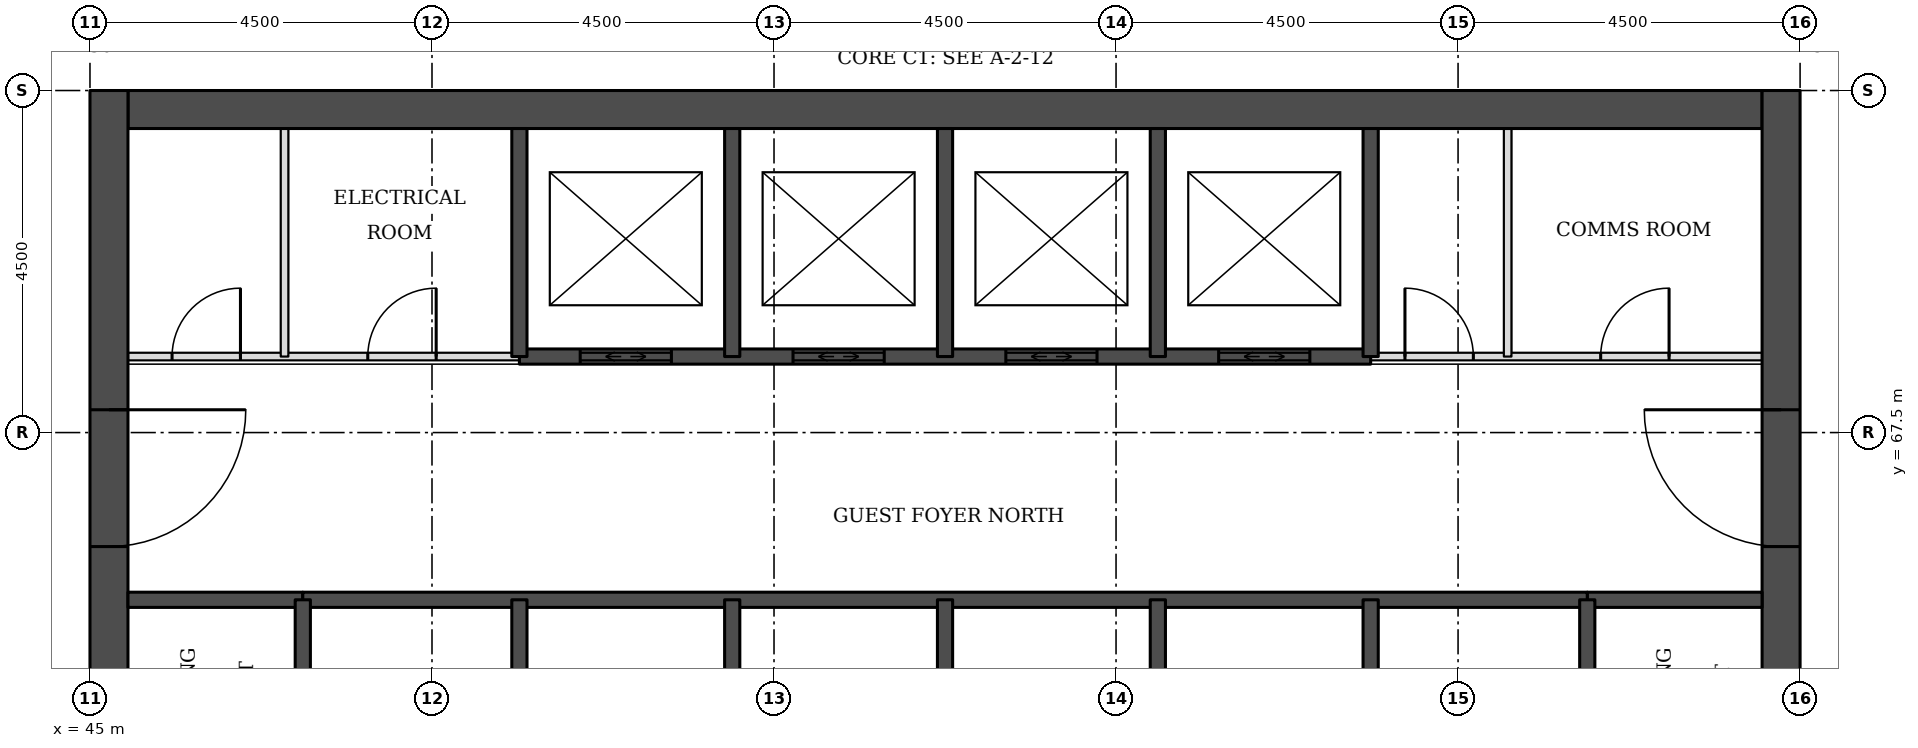
"""IFC4 building model, lengths in metres.
Left out: names, types, materials, properties, quantities, classifications, styles, units other than length and angle.
Written with IfcOpenShell. Run it as: python <this file> out.ifc"""

import sys

from ifc_helpers import new_model, si_unit, direction, frame, frame_2d, origin, place, context, subcontext, project, spatial, rectangle, extrude, element, fill, save


model = new_model("IFC4")
c1 = context("Model", 3, precision=1e-05, world=origin(), true_north=direction((0.0, 1.0)))
c2 = subcontext(c1, "Body", "Model", "MODEL_VIEW")
j1 = project(units=[si_unit("LENGTHUNIT", "METRE"), si_unit("PLANEANGLEUNIT", "RADIAN")], contexts=[c1])
p1 = place(None, origin())
s1 = spatial("IfcSite", under=j1, at=p1, CompositionType="ELEMENT")
p2 = place(p1, origin())
s2 = spatial("IfcBuilding", under=s1, at=p2, CompositionType="ELEMENT")
p3 = place(p2, frame((0.0, 0.0, 39.6)))
s3 = spatial("IfcBuildingStorey", under=s2, at=p3, CompositionType="ELEMENT", Elevation=39.6)
p4 = place(p3, frame((45.5, 71.75, 0.0), z_axis=(0.0, 0.0, 1.0), x_axis=(1.0, 0.0, 0.0)))
e1 = element("IfcWall", 1, at=p4, inside=s3, PredefinedType="SHEAR", context=c2, shape_type="SweptSolid", body=[
    extrude(rectangle(XDim=21.5, YDim=0.5, at=frame_2d((10.75, 0.0))), origin(), (0.0, 0.0, 1.0), 3.3),
])
p5 = place(p3, frame((45.25, 49.5, 0.0), z_axis=(0.0, 0.0, 1.0), x_axis=(0.0, 1.0, 0.0)))
e2 = element("IfcWall", 2, at=p5, inside=s3, PredefinedType="SHEAR", context=c2, shape_type="SweptSolid", body=[
    extrude(rectangle(XDim=22.5, YDim=0.5, at=frame_2d((11.25, 0.0))), origin(), (0.0, 0.0, 1.0), 3.3),
])
p6 = place(p5, frame((4.2, 0.0, 0.0)))
e3 = element("IfcOpeningElement", 3, at=p6, cuts=e2, PredefinedType="OPENING", context=c2, shape_type="SweptSolid", body=[
    extrude(rectangle(XDim=1.8, YDim=2.1, at=frame_2d((0.9, 1.05))), frame((0.0, 0.26, 0.0), z_axis=(0.0, -1.0, 0.0), x_axis=(1.0, 0.0, 0.0)), (0.0, 0.0, 1.0), 0.52),
])
p7 = place(p5, frame((6.9, 0.0, 0.0)))
e4 = element("IfcOpeningElement", 4, at=p7, cuts=e2, PredefinedType="OPENING", context=c2, shape_type="SweptSolid", body=[
    extrude(rectangle(XDim=1.1, YDim=2.1, at=frame_2d((0.55, 1.05))), frame((0.0, 0.26, 0.0), z_axis=(0.0, -1.0, 0.0), x_axis=(1.0, 0.0, 0.0)), (0.0, 0.0, 1.0), 0.52),
])
p8 = place(p5, frame((13.6, 0.0, 0.0)))
e5 = element("IfcOpeningElement", 5, at=p8, cuts=e2, PredefinedType="OPENING", context=c2, shape_type="SweptSolid", body=[
    extrude(rectangle(XDim=1.1, YDim=2.1, at=frame_2d((0.55, 1.05))), frame((0.0, 0.26, 0.0), z_axis=(0.0, -1.0, 0.0), x_axis=(1.0, 0.0, 0.0)), (0.0, 0.0, 1.0), 0.52),
])
p9 = place(p5, frame((16.5, 0.0, 0.0)))
e6 = element("IfcOpeningElement", 6, at=p9, cuts=e2, PredefinedType="OPENING", context=c2, shape_type="SweptSolid", body=[
    extrude(rectangle(XDim=1.8, YDim=2.1, at=frame_2d((0.9, 1.05))), frame((0.0, 0.26, 0.0), z_axis=(0.0, -1.0, 0.0), x_axis=(1.0, 0.0, 0.0)), (0.0, 0.0, 1.0), 0.52),
])
p10 = place(p3, frame((67.25, 49.5, 0.0), z_axis=(0.0, 0.0, 1.0), x_axis=(0.0, 1.0, 0.0)))
e7 = element("IfcWall", 7, at=p10, inside=s3, PredefinedType="SHEAR", context=c2, shape_type="SweptSolid", body=[
    extrude(rectangle(XDim=22.5, YDim=0.5, at=frame_2d((11.25, 0.0))), origin(), (0.0, 0.0, 1.0), 3.3),
])
p11 = place(p10, frame((4.2, 0.0, 0.0)))
e8 = element("IfcOpeningElement", 8, at=p11, cuts=e7, PredefinedType="OPENING", context=c2, shape_type="SweptSolid", body=[
    extrude(rectangle(XDim=1.8, YDim=2.1, at=frame_2d((0.9, 1.05))), frame((0.0, 0.26, 0.0), z_axis=(0.0, -1.0, 0.0), x_axis=(1.0, 0.0, 0.0)), (0.0, 0.0, 1.0), 0.52),
])
p12 = place(p10, frame((6.9, 0.0, 0.0)))
e9 = element("IfcOpeningElement", 9, at=p12, cuts=e7, PredefinedType="OPENING", context=c2, shape_type="SweptSolid", body=[
    extrude(rectangle(XDim=1.1, YDim=2.1, at=frame_2d((0.55, 1.05))), frame((0.0, 0.26, 0.0), z_axis=(0.0, -1.0, 0.0), x_axis=(1.0, 0.0, 0.0)), (0.0, 0.0, 1.0), 0.52),
])
p13 = place(p10, frame((13.6, 0.0, 0.0)))
e10 = element("IfcOpeningElement", 10, at=p13, cuts=e7, PredefinedType="OPENING", context=c2, shape_type="SweptSolid", body=[
    extrude(rectangle(XDim=1.1, YDim=2.1, at=frame_2d((0.55, 1.05))), frame((0.0, 0.26, 0.0), z_axis=(0.0, -1.0, 0.0), x_axis=(1.0, 0.0, 0.0)), (0.0, 0.0, 1.0), 0.52),
])
p14 = place(p10, frame((16.5, 0.0, 0.0)))
e11 = element("IfcOpeningElement", 11, at=p14, cuts=e7, PredefinedType="OPENING", context=c2, shape_type="SweptSolid", body=[
    extrude(rectangle(XDim=1.8, YDim=2.1, at=frame_2d((0.9, 1.05))), frame((0.0, 0.26, 0.0), z_axis=(0.0, -1.0, 0.0), x_axis=(1.0, 0.0, 0.0)), (0.0, 0.0, 1.0), 0.52),
])
for number, where, z_axis, x_axis in (
    (12, (45.5, 65.3, 0.0), (0.0, 0.0, 1.0), (1.0, 0.0, 0.0)),
    (13, (64.7, 65.3, 0.0), (0.0, 0.0, 1.0), (1.0, 0.0, 0.0)),
):
    element("IfcWall", number, at=place(p3, frame(where, z_axis=z_axis, x_axis=x_axis)), inside=s3, PredefinedType="SOLIDWALL", context=c2, shape_type="SweptSolid", body=[
        extrude(rectangle(XDim=2.3, YDim=0.2, at=frame_2d((1.15, 0.0))), origin(), (0.0, 0.0, 1.0), 3.08),
    ])
p15 = place(p3, frame((47.8, 65.3, 0.0), z_axis=(0.0, 0.0, 1.0), x_axis=(1.0, 0.0, 0.0)))
e14 = element("IfcWall", 14, at=p15, inside=s3, PredefinedType="SOLIDWALL", context=c2, shape_type="SweptSolid", body=[
    extrude(rectangle(XDim=16.9, YDim=0.2, at=frame_2d((8.45, 0.0))), origin(), (0.0, 0.0, 1.0), 3.08),
])
p16 = place(p3, frame((45.5, 68.5, 0.0), z_axis=(0.0, 0.0, 1.0), x_axis=(1.0, 0.0, 0.0)))
e15 = element("IfcWall", 15, at=p16, inside=s3, PredefinedType="PARTITIONING", context=c2, shape_type="SweptSolid", body=[
    extrude(rectangle(XDim=5.15, YDim=0.1, at=frame_2d((2.575, 0.0))), origin(), (0.0, 0.0, 1.0), 3.08),
])
p17 = place(p16, frame((0.58, 0.0, 0.0)))
e16 = element("IfcOpeningElement", 16, at=p17, cuts=e15, PredefinedType="OPENING", context=c2, shape_type="SweptSolid", body=[
    extrude(rectangle(XDim=0.9, YDim=2.1, at=frame_2d((0.45, 1.05))), frame((0.0, 0.06, 0.0), z_axis=(0.0, -1.0, 0.0), x_axis=(1.0, 0.0, 0.0)), (0.0, 0.0, 1.0), 0.12),
])
p18 = place(p16, frame((3.155, 0.0, 0.0)))
e17 = element("IfcOpeningElement", 17, at=p18, cuts=e15, PredefinedType="OPENING", context=c2, shape_type="SweptSolid", body=[
    extrude(rectangle(XDim=0.9, YDim=2.1, at=frame_2d((0.45, 1.05))), frame((0.0, 0.06, 0.0), z_axis=(0.0, -1.0, 0.0), x_axis=(1.0, 0.0, 0.0)), (0.0, 0.0, 1.0), 0.12),
])
p19 = place(p3, frame((61.85, 68.5, 0.0), z_axis=(0.0, 0.0, 1.0), x_axis=(1.0, 0.0, 0.0)))
e18 = element("IfcWall", 18, at=p19, inside=s3, PredefinedType="PARTITIONING", context=c2, shape_type="SweptSolid", body=[
    extrude(rectangle(XDim=5.15, YDim=0.1, at=frame_2d((2.575, 0.0))), origin(), (0.0, 0.0, 1.0), 3.08),
])
p20 = place(p19, frame((3.026, 0.0, 0.0)))
e19 = element("IfcOpeningElement", 19, at=p20, cuts=e18, PredefinedType="OPENING", context=c2, shape_type="SweptSolid", body=[
    extrude(rectangle(XDim=0.9, YDim=2.1, at=frame_2d((0.45, 1.05))), frame((0.0, 0.06, 0.0), z_axis=(0.0, -1.0, 0.0), x_axis=(1.0, 0.0, 0.0)), (0.0, 0.0, 1.0), 0.12),
])
p21 = place(p19, frame((0.451, 0.0, 0.0)))
e20 = element("IfcOpeningElement", 20, at=p21, cuts=e18, PredefinedType="OPENING", context=c2, shape_type="SweptSolid", body=[
    extrude(rectangle(XDim=0.9, YDim=2.1, at=frame_2d((0.45, 1.05))), frame((0.0, 0.06, 0.0), z_axis=(0.0, -1.0, 0.0), x_axis=(1.0, 0.0, 0.0)), (0.0, 0.0, 1.0), 0.12),
])
p22 = place(p3, frame((50.65, 68.5, 0.0), z_axis=(0.0, 0.0, 1.0), x_axis=(1.0, 0.0, 0.0)))
e21 = element("IfcWall", 21, at=p22, inside=s3, PredefinedType="SOLIDWALL", context=c2, shape_type="SweptSolid", body=[
    extrude(rectangle(XDim=11.2, YDim=0.2, at=frame_2d((5.6, 0.0))), origin(), (0.0, 0.0, 1.0), 3.08),
])
p23 = place(p22, frame((0.8, 0.0, 0.0)))
e22 = element("IfcOpeningElement", 22, at=p23, cuts=e21, PredefinedType="OPENING", context=c2, shape_type="SweptSolid", body=[
    extrude(rectangle(XDim=1.2, YDim=2.1, at=frame_2d((0.6, 1.05))), frame((0.0, 0.11, 0.0), z_axis=(0.0, -1.0, 0.0), x_axis=(1.0, 0.0, 0.0)), (0.0, 0.0, 1.0), 0.22),
])
p24 = place(p22, frame((3.6, 0.0, 0.0)))
e23 = element("IfcOpeningElement", 23, at=p24, cuts=e21, PredefinedType="OPENING", context=c2, shape_type="SweptSolid", body=[
    extrude(rectangle(XDim=1.2, YDim=2.1, at=frame_2d((0.6, 1.05))), frame((0.0, 0.11, 0.0), z_axis=(0.0, -1.0, 0.0), x_axis=(1.0, 0.0, 0.0)), (0.0, 0.0, 1.0), 0.22),
])
p25 = place(p22, frame((6.4, 0.0, 0.0)))
e24 = element("IfcOpeningElement", 24, at=p25, cuts=e21, PredefinedType="OPENING", context=c2, shape_type="SweptSolid", body=[
    extrude(rectangle(XDim=1.2, YDim=2.1, at=frame_2d((0.6, 1.05))), frame((0.0, 0.11, 0.0), z_axis=(0.0, -1.0, 0.0), x_axis=(1.0, 0.0, 0.0)), (0.0, 0.0, 1.0), 0.22),
])
p26 = place(p22, frame((9.2, 0.0, 0.0)))
e25 = element("IfcOpeningElement", 25, at=p26, cuts=e21, PredefinedType="OPENING", context=c2, shape_type="SweptSolid", body=[
    extrude(rectangle(XDim=1.2, YDim=2.1, at=frame_2d((0.6, 1.05))), frame((0.0, 0.11, 0.0), z_axis=(0.0, -1.0, 0.0), x_axis=(1.0, 0.0, 0.0)), (0.0, 0.0, 1.0), 0.22),
])
p27 = place(p3, frame((47.56, 68.5, 0.0), z_axis=(0.0, 0.0, 1.0), x_axis=(0.0, 1.0, 0.0)))
e26 = element("IfcWall", 26, at=p27, inside=s3, PredefinedType="PARTITIONING", context=c2, shape_type="SweptSolid", body=[
    extrude(rectangle(XDim=3.0, YDim=0.1, at=frame_2d((1.5, 0.0))), origin(), (0.0, 0.0, 1.0), 3.08),
])
p28 = place(p3, frame((47.8, 62.0, 0.0), z_axis=(0.0, 0.0, 1.0), x_axis=(0.0, 1.0, 0.0)))
e27 = element("IfcWall", 27, at=p28, inside=s3, PredefinedType="SOLIDWALL", context=c2, shape_type="SweptSolid", body=[
    extrude(rectangle(XDim=3.3, YDim=0.2, at=frame_2d((1.65, 0.0))), origin(), (0.0, 0.0, 1.0), 3.08),
])
p29 = place(p28, frame((1.1, 0.0, 0.0)))
e28 = element("IfcOpeningElement", 28, at=p29, cuts=e27, PredefinedType="OPENING", context=c2, shape_type="SweptSolid", body=[
    extrude(rectangle(XDim=1.1, YDim=2.1, at=frame_2d((0.55, 1.05))), frame((0.0, 0.11, 0.0), z_axis=(0.0, -1.0, 0.0), x_axis=(1.0, 0.0, 0.0)), (0.0, 0.0, 1.0), 0.22),
])
p30 = place(p3, frame((50.65, 62.0, 0.0), z_axis=(0.0, 0.0, 1.0), x_axis=(0.0, 1.0, 0.0)))
e29 = element("IfcWall", 29, at=p30, inside=s3, PredefinedType="SOLIDWALL", context=c2, shape_type="SweptSolid", body=[
    extrude(rectangle(XDim=3.3, YDim=0.2, at=frame_2d((1.65, 0.0))), origin(), (0.0, 0.0, 1.0), 3.08),
])
p31 = place(p3, frame((50.65, 68.5, 0.0), z_axis=(0.0, 0.0, 1.0), x_axis=(0.0, 1.0, 0.0)))
e30 = element("IfcWall", 30, at=p31, inside=s3, PredefinedType="SOLIDWALL", context=c2, shape_type="SweptSolid", body=[
    extrude(rectangle(XDim=3.0, YDim=0.2, at=frame_2d((1.5, 0.0))), origin(), (0.0, 0.0, 1.0), 3.08),
])
p32 = place(p3, frame((53.45, 62.5, 0.0), z_axis=(0.0, 0.0, 1.0), x_axis=(0.0, 1.0, 0.0)))
e31 = element("IfcWall", 31, at=p32, inside=s3, PredefinedType="SOLIDWALL", context=c2, shape_type="SweptSolid", body=[
    extrude(rectangle(XDim=2.8, YDim=0.2, at=frame_2d((1.4, 0.0))), origin(), (0.0, 0.0, 1.0), 3.08),
])
p33 = place(p3, frame((53.45, 68.5, 0.0), z_axis=(0.0, 0.0, 1.0), x_axis=(0.0, 1.0, 0.0)))
e32 = element("IfcWall", 32, at=p33, inside=s3, PredefinedType="SOLIDWALL", context=c2, shape_type="SweptSolid", body=[
    extrude(rectangle(XDim=3.0, YDim=0.2, at=frame_2d((1.5, 0.0))), origin(), (0.0, 0.0, 1.0), 3.08),
])
p34 = place(p3, frame((56.25, 62.5, 0.0), z_axis=(0.0, 0.0, 1.0), x_axis=(0.0, 1.0, 0.0)))
e33 = element("IfcWall", 33, at=p34, inside=s3, PredefinedType="SOLIDWALL", context=c2, shape_type="SweptSolid", body=[
    extrude(rectangle(XDim=2.8, YDim=0.2, at=frame_2d((1.4, 0.0))), origin(), (0.0, 0.0, 1.0), 3.08),
])
p35 = place(p3, frame((56.25, 68.5, 0.0), z_axis=(0.0, 0.0, 1.0), x_axis=(0.0, 1.0, 0.0)))
e34 = element("IfcWall", 34, at=p35, inside=s3, PredefinedType="SOLIDWALL", context=c2, shape_type="SweptSolid", body=[
    extrude(rectangle(XDim=3.0, YDim=0.2, at=frame_2d((1.5, 0.0))), origin(), (0.0, 0.0, 1.0), 3.08),
])
p36 = place(p3, frame((59.05, 62.5, 0.0), z_axis=(0.0, 0.0, 1.0), x_axis=(0.0, 1.0, 0.0)))
e35 = element("IfcWall", 35, at=p36, inside=s3, PredefinedType="SOLIDWALL", context=c2, shape_type="SweptSolid", body=[
    extrude(rectangle(XDim=2.8, YDim=0.2, at=frame_2d((1.4, 0.0))), origin(), (0.0, 0.0, 1.0), 3.08),
])
p37 = place(p3, frame((59.05, 68.5, 0.0), z_axis=(0.0, 0.0, 1.0), x_axis=(0.0, 1.0, 0.0)))
e36 = element("IfcWall", 36, at=p37, inside=s3, PredefinedType="SOLIDWALL", context=c2, shape_type="SweptSolid", body=[
    extrude(rectangle(XDim=3.0, YDim=0.2, at=frame_2d((1.5, 0.0))), origin(), (0.0, 0.0, 1.0), 3.08),
])
p38 = place(p3, frame((61.85, 62.0, 0.0), z_axis=(0.0, 0.0, 1.0), x_axis=(0.0, 1.0, 0.0)))
e37 = element("IfcWall", 37, at=p38, inside=s3, PredefinedType="SOLIDWALL", context=c2, shape_type="SweptSolid", body=[
    extrude(rectangle(XDim=3.3, YDim=0.2, at=frame_2d((1.65, 0.0))), origin(), (0.0, 0.0, 1.0), 3.08),
])
p39 = place(p3, frame((61.85, 68.5, 0.0), z_axis=(0.0, 0.0, 1.0), x_axis=(0.0, 1.0, 0.0)))
e38 = element("IfcWall", 38, at=p39, inside=s3, PredefinedType="SOLIDWALL", context=c2, shape_type="SweptSolid", body=[
    extrude(rectangle(XDim=3.0, YDim=0.2, at=frame_2d((1.5, 0.0))), origin(), (0.0, 0.0, 1.0), 3.08),
])
p40 = place(p3, frame((63.653, 68.5, 0.0), z_axis=(0.0, 0.0, 1.0), x_axis=(0.0, 1.0, 0.0)))
e39 = element("IfcWall", 39, at=p40, inside=s3, PredefinedType="PARTITIONING", context=c2, shape_type="SweptSolid", body=[
    extrude(rectangle(XDim=3.0, YDim=0.1, at=frame_2d((1.5, 0.0))), origin(), (0.0, 0.0, 1.0), 3.08),
])
p41 = place(p3, frame((64.7, 62.0, 0.0), z_axis=(0.0, 0.0, 1.0), x_axis=(0.0, 1.0, 0.0)))
e40 = element("IfcWall", 40, at=p41, inside=s3, PredefinedType="SOLIDWALL", context=c2, shape_type="SweptSolid", body=[
    extrude(rectangle(XDim=3.3, YDim=0.2, at=frame_2d((1.65, 0.0))), origin(), (0.0, 0.0, 1.0), 3.08),
])
p42 = place(p41, frame((1.1, 0.0, 0.0)))
e41 = element("IfcOpeningElement", 41, at=p42, cuts=e40, PredefinedType="OPENING", context=c2, shape_type="SweptSolid", body=[
    extrude(rectangle(XDim=1.1, YDim=2.1, at=frame_2d((0.55, 1.05))), frame((0.0, 0.11, 0.0), z_axis=(0.0, -1.0, 0.0), x_axis=(1.0, 0.0, 0.0)), (0.0, 0.0, 1.0), 0.22),
])
p43 = place(p23, origin())
e42 = element("IfcDoor", 42, at=p43, inside=s3, OperationType="DOUBLE_DOOR_SLIDING", PredefinedType="DOOR", context=c2, shape_type="SweptSolid", body=[
    extrude(rectangle(XDim=1.2, YDim=2.1, at=frame_2d((0.6, 1.05))), frame((0.0, 0.025, 0.0), z_axis=(0.0, -1.0, 0.0), x_axis=(1.0, 0.0, 0.0)), (0.0, 0.0, 1.0), 0.05),
])
fill(e22, e42)
p44 = place(p24, origin())
e43 = element("IfcDoor", 43, at=p44, inside=s3, OperationType="DOUBLE_DOOR_SLIDING", PredefinedType="DOOR", context=c2, shape_type="SweptSolid", body=[
    extrude(rectangle(XDim=1.2, YDim=2.1, at=frame_2d((0.6, 1.05))), frame((0.0, 0.025, 0.0), z_axis=(0.0, -1.0, 0.0), x_axis=(1.0, 0.0, 0.0)), (0.0, 0.0, 1.0), 0.05),
])
fill(e23, e43)
p45 = place(p25, origin())
e44 = element("IfcDoor", 44, at=p45, inside=s3, OperationType="DOUBLE_DOOR_SLIDING", PredefinedType="DOOR", context=c2, shape_type="SweptSolid", body=[
    extrude(rectangle(XDim=1.2, YDim=2.1, at=frame_2d((0.6, 1.05))), frame((0.0, 0.025, 0.0), z_axis=(0.0, -1.0, 0.0), x_axis=(1.0, 0.0, 0.0)), (0.0, 0.0, 1.0), 0.05),
])
fill(e24, e44)
p46 = place(p26, origin())
e45 = element("IfcDoor", 45, at=p46, inside=s3, OperationType="DOUBLE_DOOR_SLIDING", PredefinedType="DOOR", context=c2, shape_type="SweptSolid", body=[
    extrude(rectangle(XDim=1.2, YDim=2.1, at=frame_2d((0.6, 1.05))), frame((0.0, 0.025, 0.0), z_axis=(0.0, -1.0, 0.0), x_axis=(1.0, 0.0, 0.0)), (0.0, 0.0, 1.0), 0.05),
])
fill(e25, e45)
p47 = place(p9, frame((1.8, 0.0, 0.0), z_axis=(0.0, 0.0, 1.0), x_axis=(-1.0, 0.0, 0.0)))
e46 = element("IfcDoor", 46, at=p47, inside=s3, OperationType="SINGLE_SWING_LEFT", PredefinedType="DOOR", context=c2, shape_type="SweptSolid", body=[
    extrude(rectangle(XDim=1.8, YDim=2.1, at=frame_2d((0.9, 1.05))), frame((0.0, 0.025, 0.0), z_axis=(0.0, -1.0, 0.0), x_axis=(1.0, 0.0, 0.0)), (0.0, 0.0, 1.0), 0.05),
])
fill(e6, e46)
p48 = place(p14, origin())
e47 = element("IfcDoor", 47, at=p48, inside=s3, OperationType="SINGLE_SWING_RIGHT", PredefinedType="DOOR", context=c2, shape_type="SweptSolid", body=[
    extrude(rectangle(XDim=1.8, YDim=2.1, at=frame_2d((0.9, 1.05))), frame((0.0, 0.025, 0.0), z_axis=(0.0, -1.0, 0.0), x_axis=(1.0, 0.0, 0.0)), (0.0, 0.0, 1.0), 0.05),
])
fill(e11, e47)
p49 = place(p20, origin())
e48 = element("IfcDoor", 48, at=p49, inside=s3, OperationType="SINGLE_SWING_RIGHT", PredefinedType="DOOR", context=c2, shape_type="SweptSolid", body=[
    extrude(rectangle(XDim=0.9, YDim=2.1, at=frame_2d((0.45, 1.05))), frame((0.0, 0.025, 0.0), z_axis=(0.0, -1.0, 0.0), x_axis=(1.0, 0.0, 0.0)), (0.0, 0.0, 1.0), 0.05),
])
fill(e19, e48)
p50 = place(p21, origin())
e49 = element("IfcDoor", 49, at=p50, inside=s3, OperationType="SINGLE_SWING_LEFT", PredefinedType="DOOR", context=c2, shape_type="SweptSolid", body=[
    extrude(rectangle(XDim=0.9, YDim=2.1, at=frame_2d((0.45, 1.05))), frame((0.0, 0.025, 0.0), z_axis=(0.0, -1.0, 0.0), x_axis=(1.0, 0.0, 0.0)), (0.0, 0.0, 1.0), 0.05),
])
fill(e20, e49)
p51 = place(p17, origin())
e50 = element("IfcDoor", 50, at=p51, inside=s3, OperationType="SINGLE_SWING_RIGHT", PredefinedType="DOOR", context=c2, shape_type="SweptSolid", body=[
    extrude(rectangle(XDim=0.9, YDim=2.1, at=frame_2d((0.45, 1.05))), frame((0.0, 0.025, 0.0), z_axis=(0.0, -1.0, 0.0), x_axis=(1.0, 0.0, 0.0)), (0.0, 0.0, 1.0), 0.05),
])
fill(e16, e50)
p52 = place(p18, origin())
e51 = element("IfcDoor", 51, at=p52, inside=s3, OperationType="SINGLE_SWING_RIGHT", PredefinedType="DOOR", context=c2, shape_type="SweptSolid", body=[
    extrude(rectangle(XDim=0.9, YDim=2.1, at=frame_2d((0.45, 1.05))), frame((0.0, 0.025, 0.0), z_axis=(0.0, -1.0, 0.0), x_axis=(1.0, 0.0, 0.0)), (0.0, 0.0, 1.0), 0.05),
])
fill(e17, e51)
save(model, sys.argv[1])
